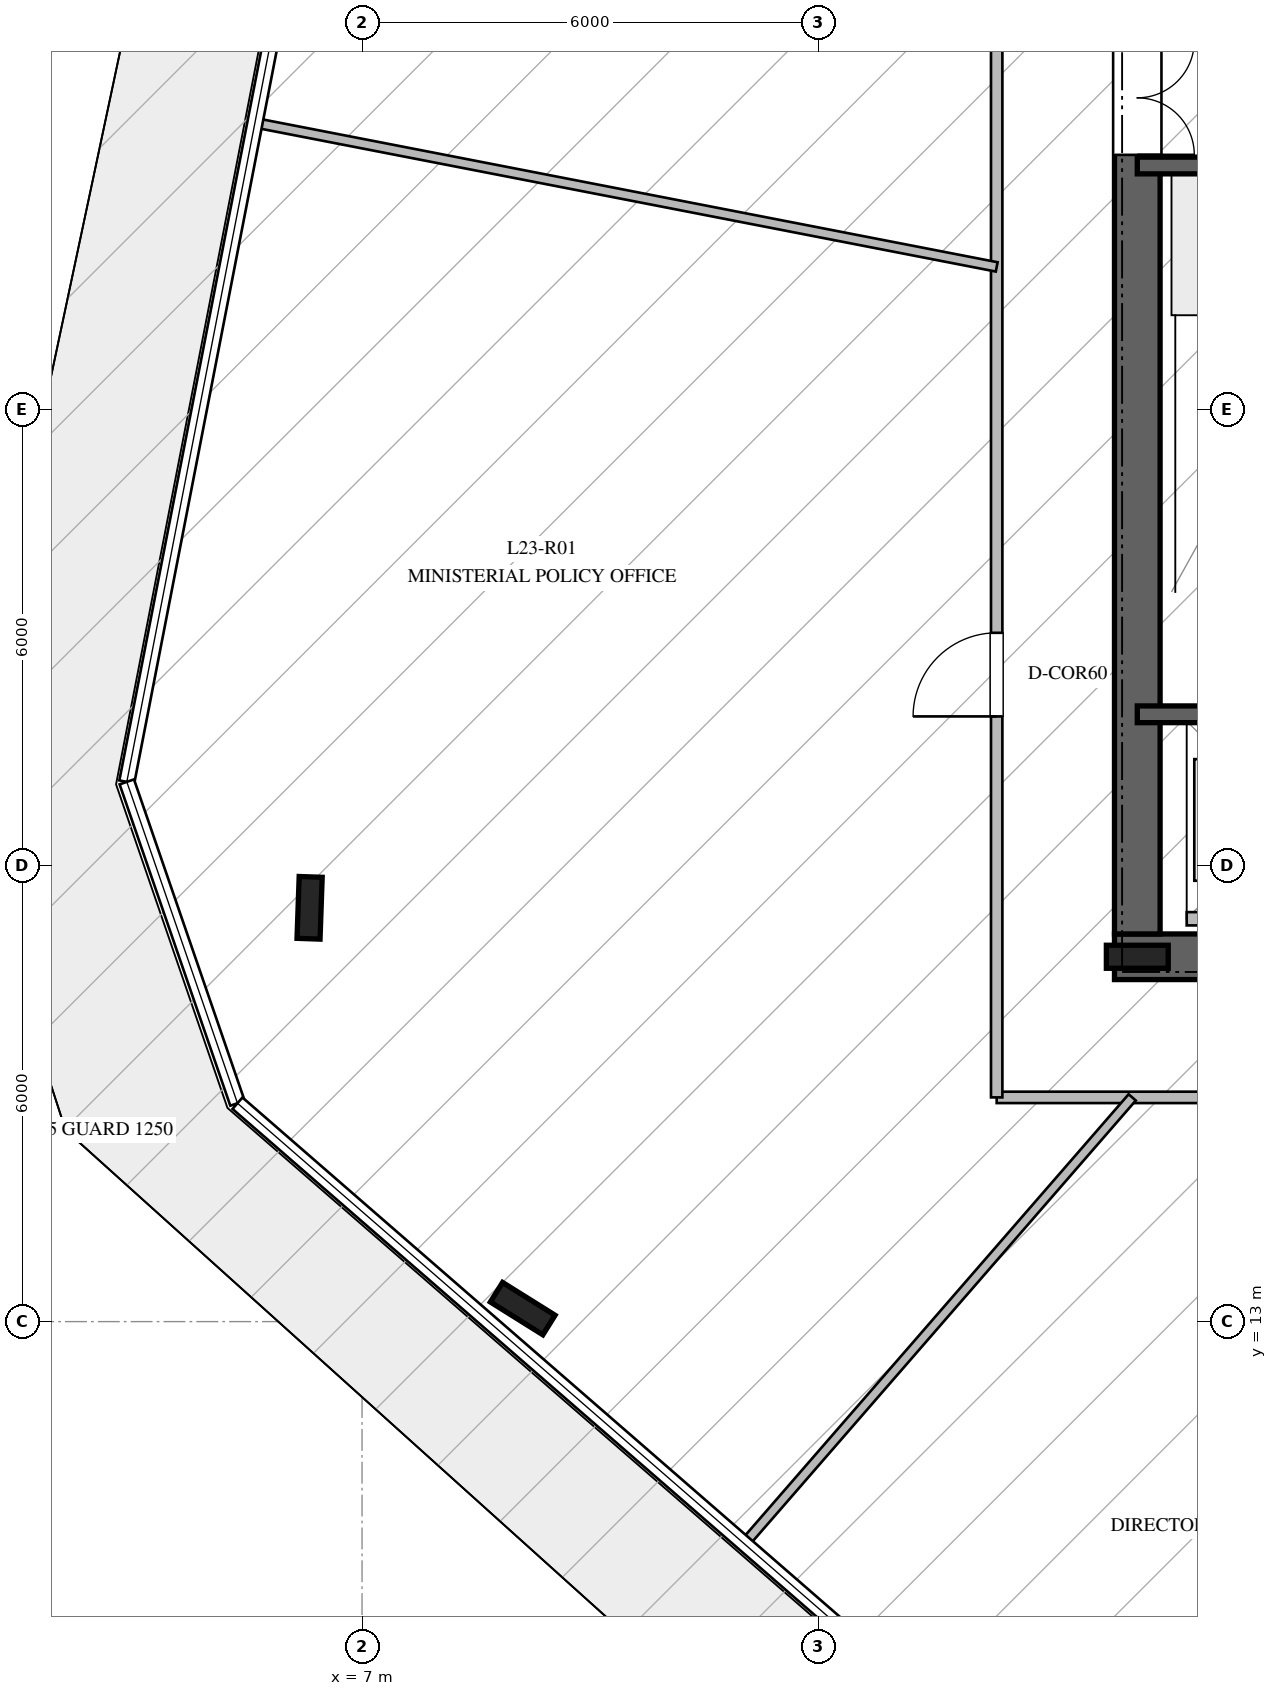
"""IFC4 building model, lengths in metres.
Left out: names, types, materials, properties, quantities, classifications, styles, units other than length and angle.
Written with IfcOpenShell. Run it as: python <this file> out.ifc"""

import sys

from ifc_helpers import new_model, si_unit, direction, frame, frame_2d, origin, origin_2d, place, context, subcontext, project, spatial, rectangle, i_section, extrude, element, fill, save


model = new_model("IFC4")
c1 = context("Model", 3, precision=1e-05, world=origin(), true_north=direction((0.0, 1.0)))
c2 = subcontext(c1, "Body", "Model", "MODEL_VIEW")
j1 = project(units=[si_unit("LENGTHUNIT", "METRE"), si_unit("PLANEANGLEUNIT", "RADIAN")], contexts=[c1])
p1 = place(None, origin())
s1 = spatial("IfcSite", under=j1, at=p1, CompositionType="ELEMENT")
p2 = place(p1, origin())
s2 = spatial("IfcBuilding", under=s1, at=p2, CompositionType="ELEMENT")
p3 = place(p2, frame((0.0, 0.0, 97.4)))
s3 = spatial("IfcBuildingStorey", under=s2, at=p3, CompositionType="ELEMENT", Elevation=97.4)
p4 = place(p3, frame((16.9, 17.8, 0.0), z_axis=(0.0, 0.0, 1.0), x_axis=(1.0, 0.0, 0.0)))
e1 = element("IfcWall", 1, at=p4, inside=s3, PredefinedType="SHEAR", context=c2, shape_type="SweptSolid", body=[
    extrude(rectangle(XDim=16.2, YDim=0.6, at=frame_2d((8.1, 0.0))), origin(), (0.0, 0.0, 1.0), 4.76),
])
p5 = place(p4, frame((5.05, 0.0, 0.0)))
e2 = element("IfcOpeningElement", 2, at=p5, cuts=e1, PredefinedType="OPENING", context=c2, shape_type="SweptSolid", body=[
    extrude(rectangle(XDim=1.2, YDim=2.25, at=frame_2d((0.6, 1.125))), frame((0.0, 0.31, 0.0), z_axis=(0.0, -1.0, 0.0), x_axis=(1.0, 0.0, 0.0)), (0.0, 0.0, 1.0), 0.62),
])
p6 = place(p4, frame((14.0, 0.0, 0.0)))
e3 = element("IfcOpeningElement", 3, at=p6, cuts=e1, PredefinedType="OPENING", context=c2, shape_type="SweptSolid", body=[
    extrude(rectangle(XDim=0.9, YDim=2.1, at=frame_2d((0.45, 1.05))), frame((0.0, 0.31, 0.0), z_axis=(0.0, -1.0, 0.0), x_axis=(1.0, 0.0, 0.0)), (0.0, 0.0, 1.0), 0.62),
])
p7 = place(p4, frame((7.9, 0.0, 0.0)))
e4 = element("IfcOpeningElement", 4, at=p7, cuts=e1, PredefinedType="OPENING", context=c2, shape_type="SweptSolid", body=[
    extrude(rectangle(XDim=1.1, YDim=2.2, at=frame_2d((0.55, 1.1))), frame((0.0, 0.31, 0.0), z_axis=(0.0, -1.0, 0.0), x_axis=(1.0, 0.0, 0.0)), (0.0, 0.0, 1.0), 0.62),
])
p8 = place(p4, frame((9.875, 0.0, 0.0)))
e5 = element("IfcOpeningElement", 5, at=p8, cuts=e1, PredefinedType="OPENING", context=c2, shape_type="SweptSolid", body=[
    extrude(rectangle(XDim=1.1, YDim=2.2, at=frame_2d((0.55, 1.1))), frame((0.0, 0.31, 0.0), z_axis=(0.0, -1.0, 0.0), x_axis=(1.0, 0.0, 0.0)), (0.0, 0.0, 1.0), 0.62),
])
p9 = place(p4, frame((11.85, 0.0, 0.0)))
e6 = element("IfcOpeningElement", 6, at=p9, cuts=e1, PredefinedType="OPENING", context=c2, shape_type="SweptSolid", body=[
    extrude(rectangle(XDim=1.1, YDim=2.2, at=frame_2d((0.55, 1.1))), frame((0.0, 0.31, 0.0), z_axis=(0.0, -1.0, 0.0), x_axis=(1.0, 0.0, 0.0)), (0.0, 0.0, 1.0), 0.62),
])
p10 = place(p3, frame((17.2, 31.9, 0.0), z_axis=(0.0, 0.0, 1.0), x_axis=(0.0, -1.0, 0.0)))
e7 = element("IfcWall", 7, at=p10, inside=s3, PredefinedType="SHEAR", context=c2, shape_type="SweptSolid", body=[
    extrude(rectangle(XDim=13.8, YDim=0.6, at=frame_2d((6.9, 0.0))), origin(), (0.0, 0.0, 1.0), 4.76),
])
p11 = place(p10, frame((2.05, 0.0, 0.0)))
e8 = element("IfcOpeningElement", 8, at=p11, cuts=e7, PredefinedType="OPENING", context=c2, shape_type="SweptSolid", body=[
    extrude(rectangle(XDim=1.5, YDim=2.2, at=frame_2d((0.75, 1.1))), frame((0.0, 0.31, 0.0), z_axis=(0.0, -1.0, 0.0), x_axis=(1.0, 0.0, 0.0)), (0.0, 0.0, 1.0), 0.62),
])
p12 = place(p3, frame((17.2, 17.8, 0.0), z_axis=(0.0, 0.0, 1.0), x_axis=(1.0, 0.0, 0.0)))
e9 = element("IfcColumn", 9, at=p12, inside=s3, PredefinedType="COLUMN", context=c2, shape_type="SweptSolid", body=[
    extrude(i_section(OverallWidth=0.303, OverallDepth=0.814, WebThickness=0.021, FlangeThickness=0.04, at=origin_2d()), origin(), (0.0, 0.0, 1.0), 5.0),
])
for number, where, z_axis, x_axis in (
    (10, (17.2, 20.99, 0.0), (0.0, 0.0, 1.0), (1.0, 0.0, 0.0)),
    (11, (17.2, 28.21, 0.0), (0.0, 0.0, 1.0), (1.0, 0.0, 0.0)),
):
    element("IfcWall", number, at=place(p3, frame(where, z_axis=z_axis, x_axis=x_axis)), inside=s3, PredefinedType="SOLIDWALL", context=c2, shape_type="SweptSolid", body=[
        extrude(rectangle(XDim=3.72, YDim=0.22, at=frame_2d((1.86, 0.0))), origin(), (0.0, 0.0, 1.0), 4.76),
    ])
for number, where, z_axis, x_axis in (
    (12, (6.31, 18.444, -0.27), (0.0, 0.0, 1.0), (0.035, 0.999, 0.0)),
    (13, (9.114, 13.171, -0.27), (0.0, 0.0, 1.0), (-0.848, 0.53, 0.0)),
):
    element("IfcColumn", number, at=place(p3, frame(where, z_axis=z_axis, x_axis=x_axis)), inside=s3, PredefinedType="COLUMN", context=c2, shape_type="SweptSolid", body=[
        extrude(i_section(OverallWidth=0.303, OverallDepth=0.814, WebThickness=0.021, FlangeThickness=0.04, at=origin_2d()), origin(), (0.0, 0.0, 1.0), 5.27),
    ])
p13 = place(p3, frame((17.85, 18.3, 0.0), z_axis=(0.0, 0.0, 1.0), x_axis=(1.0, 0.0, 0.0)))
e14 = element("IfcWall", 14, at=p13, inside=s3, PredefinedType="PARTITIONING", context=c2, shape_type="SweptSolid", body=[
    extrude(rectangle(XDim=2.6, YDim=0.175, at=frame_2d((1.3, 0.0))), origin(), (0.0, 0.0, 1.0), 4.76),
])
p14 = place(p3, frame((34.65, 15.95, 0.0), z_axis=(0.0, 0.0, 1.0), x_axis=(-1.0, 0.0, 0.0)))
e15 = element("IfcWall", 15, at=p14, inside=s3, PredefinedType="PARTITIONING", context=c2, shape_type="SweptSolid", body=[
    extrude(rectangle(XDim=19.3, YDim=0.15, at=frame_2d((9.65, 0.0))), origin(), (0.0, 0.0, 1.0), 4.21),
])
p15 = place(p14, frame((12.227, 0.0, 0.0)))
e16 = element("IfcOpeningElement", 16, at=p15, cuts=e15, PredefinedType="OPENING", context=c2, shape_type="SweptSolid", body=[
    extrude(rectangle(XDim=1.1, YDim=2.2, at=frame_2d((0.55, 1.1))), frame((0.0, 0.085, 0.0), z_axis=(0.0, -1.0, 0.0), x_axis=(1.0, 0.0, 0.0)), (0.0, 0.0, 1.0), 0.17),
])
p16 = place(p3, frame((15.35, 15.95, 0.0), z_axis=(0.0, 0.0, 1.0), x_axis=(0.0, 1.0, 0.0)))
e17 = element("IfcWall", 17, at=p16, inside=s3, PredefinedType="PARTITIONING", context=c2, shape_type="SweptSolid", body=[
    extrude(rectangle(XDim=18.1, YDim=0.15, at=frame_2d((9.05, 0.0))), origin(), (0.0, 0.0, 1.0), 4.21),
])
p17 = place(p16, frame((5.012, 0.0, 0.0)))
e18 = element("IfcOpeningElement", 18, at=p17, cuts=e17, PredefinedType="OPENING", context=c2, shape_type="SweptSolid", body=[
    extrude(rectangle(XDim=1.1, YDim=2.2, at=frame_2d((0.55, 1.1))), frame((0.0, 0.085, 0.0), z_axis=(0.0, -1.0, 0.0), x_axis=(1.0, 0.0, 0.0)), (0.0, 0.0, 1.0), 0.17),
])
p18 = place(p3, frame((15.35, 26.876, 0.0), z_axis=(0.0, 0.0, 1.0), x_axis=(-0.981638939677, 0.190748504868, 0.0)))
e19 = element("IfcWall", 19, at=p18, inside=s3, PredefinedType="PARTITIONING", context=c2, shape_type="SweptSolid", body=[
    extrude(rectangle(XDim=9.924, YDim=0.125, at=frame_2d((4.962, 0.0))), origin(), (0.0, 0.0, 1.0), 4.16),
])
p19 = place(p3, frame((17.133, 15.95, 0.0), z_axis=(0.0, 0.0, 1.0), x_axis=(-0.655994183005, -0.754765945088, 0.0)))
e20 = element("IfcWall", 20, at=p19, inside=s3, PredefinedType="PARTITIONING", context=c2, shape_type="SweptSolid", body=[
    extrude(rectangle(XDim=7.764, YDim=0.125, at=frame_2d((3.882, 0.0))), origin(), (0.0, 0.0, 1.0), 4.16),
])
p20 = place(p11, origin())
e21 = element("IfcDoor", 21, at=p20, inside=s3, OperationType="DOUBLE_DOOR_SINGLE_SWING", PredefinedType="DOOR", context=c2, shape_type="SweptSolid", body=[
    extrude(rectangle(XDim=1.5, YDim=2.2, at=frame_2d((0.75, 1.1))), frame((0.0, 0.025, 0.0), z_axis=(0.0, -1.0, 0.0), x_axis=(1.0, 0.0, 0.0)), (0.0, 0.0, 1.0), 0.05),
])
fill(e8, e21)
p21 = place(p17, origin())
e22 = element("IfcDoor", 22, at=p21, inside=s3, OperationType="SINGLE_SWING_LEFT", PredefinedType="DOOR", context=c2, shape_type="SweptSolid", body=[
    extrude(rectangle(XDim=1.1, YDim=2.2, at=frame_2d((0.55, 1.1))), frame((0.0, 0.025, 0.0), z_axis=(0.0, -1.0, 0.0), x_axis=(1.0, 0.0, 0.0)), (0.0, 0.0, 1.0), 0.05),
])
fill(e18, e22)
save(model, sys.argv[1])
